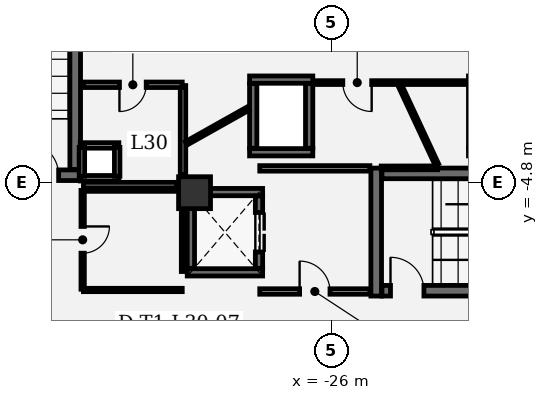
"""IFC4 building model, lengths in metres.
Left out: names, types, materials, properties, quantities, classifications, styles, units other than length and angle.
Written with IfcOpenShell. Run it as: python <this file> out.ifc"""

import sys

from ifc_helpers import new_model, si_unit, direction, frame, frame_2d, origin, origin_2d, place, context, subcontext, project, spatial, rectangle, extrude, element, fill, save


model = new_model("IFC4")
c1 = context("Model", 3, precision=1e-05, world=origin(), true_north=direction((0.0, 1.0)))
c2 = subcontext(c1, "Body", "Model", "MODEL_VIEW")
j1 = project(units=[si_unit("LENGTHUNIT", "METRE"), si_unit("PLANEANGLEUNIT", "RADIAN")], contexts=[c1])
p1 = place(None, origin())
s1 = spatial("IfcSite", under=j1, at=p1, CompositionType="ELEMENT")
p2 = place(p1, origin())
s2 = spatial("IfcBuilding", under=s1, at=p2, CompositionType="ELEMENT")
p3 = place(p2, frame((0.0, 0.0, 134.1)))
s3 = spatial("IfcBuildingStorey", under=s2, at=p3, CompositionType="ELEMENT", Elevation=134.1)
p4 = place(p3, frame((-30.5, -5.15, 0.0), z_axis=(0.0, 0.0, 1.0), x_axis=(1.0, 0.0, 0.0)))
e1 = element("IfcColumn", 1, at=p4, inside=s3, PredefinedType="COLUMN", context=c2, shape_type="SweptSolid", body=[
    extrude(rectangle(XDim=1.05, YDim=1.05, at=origin_2d()), origin(), (0.0, 0.0, 1.0), 4.05),
])
p5 = place(p3, frame((-24.525, -4.34, 0.0), z_axis=(0.0, 0.0, 1.0), x_axis=(0.0, -1.0, 0.0)))
e2 = element("IfcWall", 2, at=p5, inside=s3, PredefinedType="SHEAR", context=c2, shape_type="SweptSolid", body=[
    extrude(rectangle(XDim=4.21, YDim=0.35, at=frame_2d((2.105, 0.0))), origin(), (0.0, 0.0, 1.0), 3.78),
])
p6 = place(p3, frame((-24.335, -8.375, 0.0), z_axis=(0.0, 0.0, 1.0), x_axis=(1.0, 0.0, 0.0)))
e3 = element("IfcWall", 3, at=p6, inside=s3, PredefinedType="SHEAR", context=c2, shape_type="SweptSolid", body=[
    extrude(rectangle(XDim=8.12, YDim=0.35, at=frame_2d((4.06, 0.0))), origin(), (0.0, 0.0, 1.0), 3.78),
])
p7 = place(p6, frame((0.28, 0.0, 0.0)))
e4 = element("IfcOpeningElement", 4, at=p7, cuts=e3, PredefinedType="OPENING", context=c2, shape_type="SweptSolid", body=[
    extrude(rectangle(XDim=1.1, YDim=2.2, at=frame_2d((0.55, 1.1))), frame((0.0, 0.185, 0.0), z_axis=(0.0, -1.0, 0.0), x_axis=(1.0, 0.0, 0.0)), (0.0, 0.0, 1.0), 0.37),
])
p8 = place(p3, frame((-16.215, -4.515, 0.0), z_axis=(0.0, 0.0, 1.0), x_axis=(-1.0, 0.0, 0.0)))
e5 = element("IfcWall", 5, at=p8, inside=s3, PredefinedType="SHEAR", context=c2, shape_type="SweptSolid", body=[
    extrude(rectangle(XDim=8.12, YDim=0.35, at=frame_2d((4.06, 0.0))), origin(), (0.0, 0.0, 1.0), 3.78),
])
p9 = place(p3, frame((-38.46, -4.575, 0.0), z_axis=(0.0, 0.0, 1.0), x_axis=(1.0, 0.0, 0.0)))
e6 = element("IfcWall", 6, at=p9, inside=s3, PredefinedType="SHEAR", context=c2, shape_type="SweptSolid", body=[
    extrude(rectangle(XDim=4.21, YDim=0.35, at=frame_2d((2.105, 0.0))), origin(), (0.0, 0.0, 1.0), 3.78),
])
p10 = place(p9, frame((2.39, 0.0, 0.0)))
e7 = element("IfcOpeningElement", 7, at=p10, cuts=e6, PredefinedType="OPENING", context=c2, shape_type="SweptSolid", body=[
    extrude(rectangle(XDim=1.1, YDim=2.2, at=frame_2d((0.55, 1.1))), frame((0.0, 0.185, 0.0), z_axis=(0.0, -1.0, 0.0), x_axis=(1.0, 0.0, 0.0)), (0.0, 0.0, 1.0), 0.37),
])
p11 = place(p3, frame((-34.425, -4.385, 0.0), z_axis=(0.0, 0.0, 1.0), x_axis=(0.0, 1.0, 0.0)))
e8 = element("IfcWall", 8, at=p11, inside=s3, PredefinedType="SHEAR", context=c2, shape_type="SweptSolid", body=[
    extrude(rectangle(XDim=8.77, YDim=0.35, at=frame_2d((4.385, 0.0))), origin(), (0.0, 0.0, 1.0), 3.78),
])
for number, where, z_axis, x_axis in (
    (9, (-28.26, -7.77, 0.0), (0.0, 0.0, 1.0), (-1.0, 0.0, 0.0)),
    (10, (-30.74, -5.13, 0.0), (0.0, 0.0, 1.0), (1.0, 0.0, 0.0)),
):
    element("IfcWall", number, at=place(p3, frame(where, z_axis=z_axis, x_axis=x_axis)), inside=s3, PredefinedType="SHEAR", context=c2, shape_type="SweptSolid", body=[
        extrude(rectangle(XDim=2.48, YDim=0.24, at=frame_2d((1.24, 0.0))), origin(), (0.0, 0.0, 1.0), 3.78),
    ])
p12 = place(p3, frame((-30.62, -7.638, 0.0), z_axis=(0.0, 0.0, 1.0), x_axis=(0.0, 1.0, 0.0)))
e11 = element("IfcWall", 11, at=p12, inside=s3, PredefinedType="SHEAR", context=c2, shape_type="SweptSolid", body=[
    extrude(rectangle(XDim=2.376, YDim=0.24, at=frame_2d((1.188, 0.0))), origin(), (0.0, 0.0, 1.0), 3.78),
])
p13 = place(p3, frame((-28.38, -5.262, 0.0), z_axis=(0.0, 0.0, 1.0), x_axis=(0.0, -1.0, 0.0)))
e12 = element("IfcWall", 12, at=p13, inside=s3, PredefinedType="SHEAR", context=c2, shape_type="SweptSolid", body=[
    extrude(rectangle(XDim=2.376, YDim=0.24, at=frame_2d((1.188, 0.0))), origin(), (0.0, 0.0, 1.0), 3.78),
])
p14 = place(p13, frame((0.538, 0.0, 0.0)))
e13 = element("IfcOpeningElement", 13, at=p14, cuts=e12, PredefinedType="OPENING", context=c2, shape_type="SweptSolid", body=[
    extrude(rectangle(XDim=1.3, YDim=2.3, at=frame_2d((0.65, 1.15))), frame((0.0, 0.13, 0.0), z_axis=(0.0, -1.0, 0.0), x_axis=(1.0, 0.0, 0.0)), (0.0, 0.0, 1.0), 0.26),
])
for number, where, z_axis, x_axis in (
    (14, (-26.61, -3.82, 0.0), (0.0, 0.0, 1.0), (-1.0, 0.0, 0.0)),
    (15, (-28.69, -1.43, 0.0), (0.0, 0.0, 1.0), (1.0, 0.0, 0.0)),
):
    element("IfcWall", number, at=place(p3, frame(where, z_axis=z_axis, x_axis=x_axis)), inside=s3, PredefinedType="SHEAR", context=c2, shape_type="SweptSolid", body=[
        extrude(rectangle(XDim=2.08, YDim=0.24, at=frame_2d((1.04, 0.0))), origin(), (0.0, 0.0, 1.0), 3.78),
    ])
for number, where, z_axis, x_axis in (
    (16, (-28.57, -3.688, 0.0), (0.0, 0.0, 1.0), (0.0, 1.0, 0.0)),
    (17, (-26.73, -1.562, 0.0), (0.0, 0.0, 1.0), (0.0, -1.0, 0.0)),
):
    element("IfcWall", number, at=place(p3, frame(where, z_axis=z_axis, x_axis=x_axis)), inside=s3, PredefinedType="SHEAR", context=c2, shape_type="SweptSolid", body=[
        extrude(rectangle(XDim=2.126, YDim=0.24, at=frame_2d((1.063, 0.0))), origin(), (0.0, 0.0, 1.0), 3.78),
    ])
p15 = place(p3, frame((-19.41, -3.82, 0.0), z_axis=(0.0, 0.0, 1.0), x_axis=(-1.0, 0.0, 0.0)))
e18 = element("IfcWall", 18, at=p15, inside=s3, PredefinedType="SHEAR", context=c2, shape_type="SweptSolid", body=[
    extrude(rectangle(XDim=2.08, YDim=0.24, at=frame_2d((1.04, 0.0))), origin(), (0.0, 0.0, 1.0), 3.78),
])
p16 = place(p3, frame((-21.49, -1.43, 0.0), z_axis=(0.0, 0.0, 1.0), x_axis=(1.0, 0.0, 0.0)))
e19 = element("IfcWall", 19, at=p16, inside=s3, PredefinedType="SHEAR", context=c2, shape_type="SweptSolid", body=[
    extrude(rectangle(XDim=2.08, YDim=0.24, at=frame_2d((1.04, 0.0))), origin(), (0.0, 0.0, 1.0), 3.78),
])
p17 = place(p16, frame((0.49, 0.0, 0.0)))
e20 = element("IfcOpeningElement", 20, at=p17, cuts=e19, PredefinedType="OPENING", context=c2, shape_type="SweptSolid", body=[
    extrude(rectangle(XDim=1.1, YDim=2.2, at=frame_2d((0.55, 1.1))), frame((0.0, 0.13, 0.0), z_axis=(0.0, -1.0, 0.0), x_axis=(1.0, 0.0, 0.0)), (0.0, 0.0, 1.0), 0.26),
])
p18 = place(p3, frame((-21.37, -3.688, 0.0), z_axis=(0.0, 0.0, 1.0), x_axis=(0.0, 1.0, 0.0)))
e21 = element("IfcWall", 21, at=p18, inside=s3, PredefinedType="SHEAR", context=c2, shape_type="SweptSolid", body=[
    extrude(rectangle(XDim=2.126, YDim=0.24, at=frame_2d((1.063, 0.0))), origin(), (0.0, 0.0, 1.0), 3.78),
])
for number, where, z_axis, x_axis in (
    (22, (-32.99, -4.675, 0.0), (0.0, 0.0, 1.0), (-1.0, 0.0, 0.0)),
    (23, (-34.26, -3.595, 0.0), (0.0, 0.0, 1.0), (1.0, 0.0, 0.0)),
):
    element("IfcWall", number, at=place(p3, frame(where, z_axis=z_axis, x_axis=x_axis)), inside=s3, PredefinedType="PARTITIONING", context=c2, shape_type="SweptSolid", body=[
        extrude(rectangle(XDim=1.27, YDim=0.18, at=frame_2d((0.635, 0.0))), origin(), (0.0, 0.0, 1.0), 3.78),
    ])
for number, where, z_axis, x_axis in (
    (24, (-34.205, -4.61, 0.0), (0.0, 0.0, 1.0), (0.0, 1.0, 0.0)),
    (25, (-33.045, -3.66, 0.0), (0.0, 0.0, 1.0), (0.0, -1.0, 0.0)),
):
    element("IfcWall", number, at=place(p3, frame(where, z_axis=z_axis, x_axis=x_axis)), inside=s3, PredefinedType="PARTITIONING", context=c2, shape_type="SweptSolid", body=[
        extrude(rectangle(XDim=0.95, YDim=0.18, at=frame_2d((0.475, 0.0))), origin(), (0.0, 0.0, 1.0), 3.78),
    ])
p19 = place(p3, frame((-28.355, -8.4, 0.0), z_axis=(0.0, 0.0, 1.0), x_axis=(1.0, 0.0, 0.0)))
e26 = element("IfcWall", 26, at=p19, inside=s3, PredefinedType="PARTITIONING", context=c2, shape_type="SweptSolid", body=[
    extrude(rectangle(XDim=3.622, YDim=0.18, at=frame_2d((1.811, 0.0))), origin(), (0.0, 0.0, 1.0), 3.78),
])
p20 = place(p19, frame((1.311, 0.0, 0.0)))
e27 = element("IfcOpeningElement", 27, at=p20, cuts=e26, PredefinedType="OPENING", context=c2, shape_type="SweptSolid", body=[
    extrude(rectangle(XDim=1.0, YDim=2.15, at=frame_2d((0.5, 1.075))), frame((0.0, 0.1, 0.0), z_axis=(0.0, -1.0, 0.0), x_axis=(1.0, 0.0, 0.0)), (0.0, 0.0, 1.0), 0.2),
])
p21 = place(p3, frame((-24.733, -4.35, 0.0), z_axis=(0.0, 0.0, 1.0), x_axis=(-1.0, 0.0, 0.0)))
e28 = element("IfcWall", 28, at=p21, inside=s3, PredefinedType="PARTITIONING", context=c2, shape_type="SweptSolid", body=[
    extrude(rectangle(XDim=3.622, YDim=0.18, at=frame_2d((1.811, 0.0))), origin(), (0.0, 0.0, 1.0), 3.78),
])
p22 = place(p3, frame((-34.155, -8.35, 0.0), z_axis=(0.0, 0.0, 1.0), x_axis=(1.0, 0.0, 0.0)))
e29 = element("IfcWall", 29, at=p22, inside=s3, PredefinedType="PARTITIONING", context=c2, shape_type="SweptSolid", body=[
    extrude(rectangle(XDim=3.25, YDim=0.11, at=frame_2d((1.625, 0.0))), origin(), (0.0, 0.0, 1.0), 3.78),
])
p23 = place(p3, frame((-30.88, -7.743, 0.0), z_axis=(0.0, 0.0, 1.0), x_axis=(0.0, 1.0, 0.0)))
e30 = element("IfcWall", 30, at=p23, inside=s3, PredefinedType="PARTITIONING", context=c2, shape_type="SweptSolid", body=[
    extrude(rectangle(XDim=2.003, YDim=0.11, at=frame_2d((1.001, 0.0))), origin(), (0.0, 0.0, 1.0), 3.78),
])
p24 = place(p3, frame((-31.09, -5.05, 0.0), z_axis=(0.0, 0.0, 1.0), x_axis=(-1.0, 0.0, 0.0)))
e31 = element("IfcWall", 31, at=p24, inside=s3, PredefinedType="PARTITIONING", context=c2, shape_type="SweptSolid", body=[
    extrude(rectangle(XDim=3.065, YDim=0.11, at=frame_2d((1.532, 0.0))), origin(), (0.0, 0.0, 1.0), 3.78),
])
p25 = place(p3, frame((-34.18, -5.075, 0.0), z_axis=(0.0, 0.0, 1.0), x_axis=(0.0, -1.0, 0.0)))
e32 = element("IfcWall", 32, at=p25, inside=s3, PredefinedType="PARTITIONING", context=c2, shape_type="SweptSolid", body=[
    extrude(rectangle(XDim=3.25, YDim=0.11, at=frame_2d((1.625, 0.0))), origin(), (0.0, 0.0, 1.0), 3.78),
])
p26 = place(p25, frame((1.185, 0.0, 0.0)))
e33 = element("IfcOpeningElement", 33, at=p26, cuts=e32, PredefinedType="OPENING", context=c2, shape_type="SweptSolid", body=[
    extrude(rectangle(XDim=0.88, YDim=2.1, at=frame_2d((0.44, 1.05))), frame((0.0, 0.065, 0.0), z_axis=(0.0, -1.0, 0.0), x_axis=(1.0, 0.0, 0.0)), (0.0, 0.0, 1.0), 0.13),
])
p27 = place(p3, frame((-34.155, -4.9, 0.0), z_axis=(0.0, 0.0, 1.0), x_axis=(1.0, 0.0, 0.0)))
e34 = element("IfcWall", 34, at=p27, inside=s3, PredefinedType="PARTITIONING", context=c2, shape_type="SweptSolid", body=[
    extrude(rectangle(XDim=3.065, YDim=0.18, at=frame_2d((1.532, 0.0))), origin(), (0.0, 0.0, 1.0), 3.78),
])
p28 = place(p3, frame((-30.88, -4.56, 0.0), z_axis=(0.0, 0.0, 1.0), x_axis=(0.0, 1.0, 0.0)))
e35 = element("IfcWall", 35, at=p28, inside=s3, PredefinedType="PARTITIONING", context=c2, shape_type="SweptSolid", body=[
    extrude(rectangle(XDim=2.935, YDim=0.18, at=frame_2d((1.468, 0.0))), origin(), (0.0, 0.0, 1.0), 3.78),
])
p29 = place(p3, frame((-30.905, -1.6, 0.0), z_axis=(0.0, 0.0, 1.0), x_axis=(-1.0, 0.0, 0.0)))
e36 = element("IfcWall", 36, at=p29, inside=s3, PredefinedType="PARTITIONING", context=c2, shape_type="SweptSolid", body=[
    extrude(rectangle(XDim=3.25, YDim=0.18, at=frame_2d((1.625, 0.0))), origin(), (0.0, 0.0, 1.0), 3.78),
])
p30 = place(p29, frame((1.185, 0.0, 0.0)))
e37 = element("IfcOpeningElement", 37, at=p30, cuts=e36, PredefinedType="OPENING", context=c2, shape_type="SweptSolid", body=[
    extrude(rectangle(XDim=0.88, YDim=2.1, at=frame_2d((0.44, 1.05))), frame((0.0, 0.1, 0.0), z_axis=(0.0, -1.0, 0.0), x_axis=(1.0, 0.0, 0.0)), (0.0, 0.0, 1.0), 0.2),
])
p31 = place(p3, frame((-23.812, -1.528, 0.0), z_axis=(0.0, 0.0, 1.0), x_axis=(-1.0, 0.0, 0.0)))
e38 = element("IfcWall", 38, at=p31, inside=s3, PredefinedType="PARTITIONING", context=c2, shape_type="SweptSolid", body=[
    extrude(rectangle(XDim=2.673, YDim=0.125, at=frame_2d((1.336, 0.0))), origin(), (0.0, 0.0, 1.0), 3.78),
])
p32 = place(p31, frame((0.861, 0.0, 0.0)))
e39 = element("IfcOpeningElement", 39, at=p32, cuts=e38, PredefinedType="OPENING", context=c2, shape_type="SweptSolid", body=[
    extrude(rectangle(XDim=0.95, YDim=2.15, at=frame_2d((0.475, 1.075))), frame((0.0, 0.073, 0.0), z_axis=(0.0, -1.0, 0.0), x_axis=(1.0, 0.0, 0.0)), (0.0, 0.0, 1.0), 0.145),
])
p33 = place(p3, frame((-28.732, -2.379, 0.0), z_axis=(0.0, 0.0, 1.0), x_axis=(-0.871711937641, -0.490018670842, 0.0)))
e40 = element("IfcWall", 40, at=p33, inside=s3, PredefinedType="PARTITIONING", context=c2, shape_type="SweptSolid", body=[
    extrude(rectangle(XDim=2.342, YDim=0.125, at=frame_2d((1.171, 0.0))), origin(), (0.0, 0.0, 1.0), 3.78),
])
p34 = place(p3, frame((-24.36, -4.335, 0.0), z_axis=(0.0, 0.0, 1.0), x_axis=(0.999998537438, 0.001710298775, 0.0)))
e41 = element("IfcWall", 41, at=p34, inside=s3, PredefinedType="PARTITIONING", context=c2, shape_type="SweptSolid", body=[
    extrude(rectangle(XDim=1.856, YDim=0.125, at=frame_2d((0.928, 0.0))), origin(), (0.0, 0.0, 1.0), 3.78),
])
p35 = place(p3, frame((-22.53, -4.224, 0.0), z_axis=(0.0, 0.0, 1.0), x_axis=(-0.422717831819, 0.906261350088, 0.0)))
e42 = element("IfcWall", 42, at=p35, inside=s3, PredefinedType="PARTITIONING", context=c2, shape_type="SweptSolid", body=[
    extrude(rectangle(XDim=2.95, YDim=0.125, at=frame_2d((1.475, 0.0))), origin(), (0.0, 0.0, 1.0), 3.78),
])
p36 = place(p3, frame((-21.615, -1.528, 0.0), z_axis=(0.0, 0.0, 1.0), x_axis=(-1.0, 0.0, 0.0)))
e43 = element("IfcWall", 43, at=p36, inside=s3, PredefinedType="PARTITIONING", context=c2, shape_type="SweptSolid", body=[
    extrude(rectangle(XDim=2.054, YDim=0.125, at=frame_2d((1.027, 0.0))), origin(), (0.0, 0.0, 1.0), 3.78),
])
p37 = place(p7, origin())
e44 = element("IfcDoor", 44, at=p37, inside=s3, OperationType="SINGLE_SWING_LEFT", PredefinedType="DOOR", context=c2, shape_type="SweptSolid", body=[
    extrude(rectangle(XDim=1.1, YDim=2.2, at=frame_2d((0.55, 1.1))), frame((0.0, 0.025, 0.0), z_axis=(0.0, -1.0, 0.0), x_axis=(1.0, 0.0, 0.0)), (0.0, 0.0, 1.0), 0.05),
])
fill(e4, e44)
p38 = place(p10, origin())
e45 = element("IfcDoor", 45, at=p38, inside=s3, OperationType="SINGLE_SWING_LEFT", PredefinedType="DOOR", context=c2, shape_type="SweptSolid", body=[
    extrude(rectangle(XDim=1.1, YDim=2.2, at=frame_2d((0.55, 1.1))), frame((0.0, 0.025, 0.0), z_axis=(0.0, -1.0, 0.0), x_axis=(1.0, 0.0, 0.0)), (0.0, 0.0, 1.0), 0.05),
])
fill(e7, e45)
p39 = place(p14, origin())
e46 = element("IfcDoor", 46, at=p39, inside=s3, OperationType="DOUBLE_DOOR_SLIDING", PredefinedType="DOOR", context=c2, shape_type="SweptSolid", body=[
    extrude(rectangle(XDim=1.3, YDim=2.3, at=frame_2d((0.65, 1.15))), frame((0.0, 0.025, 0.0), z_axis=(0.0, -1.0, 0.0), x_axis=(1.0, 0.0, 0.0)), (0.0, 0.0, 1.0), 0.05),
])
fill(e13, e46)
p40 = place(p26, origin())
e47 = element("IfcDoor", 47, at=p40, inside=s3, OperationType="SINGLE_SWING_LEFT", PredefinedType="DOOR", context=c2, shape_type="SweptSolid", body=[
    extrude(rectangle(XDim=0.88, YDim=2.1, at=frame_2d((0.44, 1.05))), frame((0.0, 0.025, 0.0), z_axis=(0.0, -1.0, 0.0), x_axis=(1.0, 0.0, 0.0)), (0.0, 0.0, 1.0), 0.05),
])
fill(e33, e47)
p41 = place(p30, origin())
e48 = element("IfcDoor", 48, at=p41, inside=s3, OperationType="SINGLE_SWING_RIGHT", PredefinedType="DOOR", context=c2, shape_type="SweptSolid", body=[
    extrude(rectangle(XDim=0.88, YDim=2.1, at=frame_2d((0.44, 1.05))), frame((0.0, 0.025, 0.0), z_axis=(0.0, -1.0, 0.0), x_axis=(1.0, 0.0, 0.0)), (0.0, 0.0, 1.0), 0.05),
])
fill(e37, e48)
p42 = place(p32, origin())
e49 = element("IfcDoor", 49, at=p42, inside=s3, OperationType="SINGLE_SWING_LEFT", PredefinedType="DOOR", context=c2, shape_type="SweptSolid", body=[
    extrude(rectangle(XDim=0.95, YDim=2.15, at=frame_2d((0.475, 1.075))), frame((0.0, 0.025, 0.0), z_axis=(0.0, -1.0, 0.0), x_axis=(1.0, 0.0, 0.0)), (0.0, 0.0, 1.0), 0.05),
])
fill(e39, e49)
p43 = place(p20, origin())
e50 = element("IfcDoor", 50, at=p43, inside=s3, OperationType="SINGLE_SWING_LEFT", PredefinedType="DOOR", context=c2, shape_type="SweptSolid", body=[
    extrude(rectangle(XDim=1.0, YDim=2.15, at=frame_2d((0.5, 1.075))), frame((0.0, 0.025, 0.0), z_axis=(0.0, -1.0, 0.0), x_axis=(1.0, 0.0, 0.0)), (0.0, 0.0, 1.0), 0.05),
])
fill(e27, e50)
save(model, sys.argv[1])
